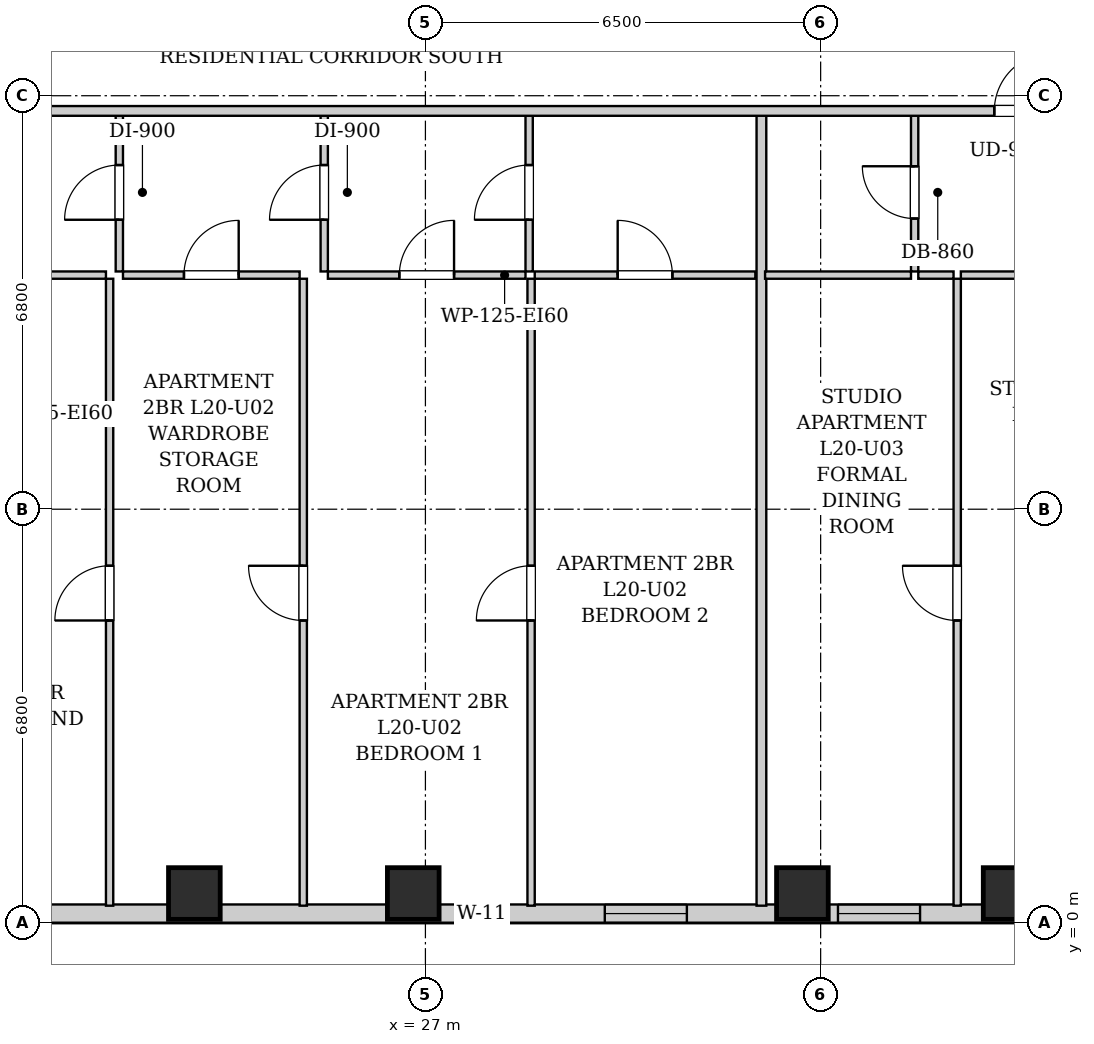
"""IFC4 building model, lengths in metres.
Left out: names, types, materials, properties, quantities, classifications, styles, units other than length and angle.
Written with IfcOpenShell. Run it as: python <this file> out.ifc"""

import sys

from ifc_helpers import new_model, si_unit, direction, frame, frame_2d, origin, origin_2d, place, context, subcontext, project, spatial, rectangle, extrude, element, fill, save


model = new_model("IFC4")
c1 = context("Model", 3, precision=1e-05, world=origin(), true_north=direction((0.0, 1.0)))
c2 = subcontext(c1, "Body", "Model", "MODEL_VIEW")
j1 = project(units=[si_unit("LENGTHUNIT", "METRE"), si_unit("PLANEANGLEUNIT", "RADIAN")], contexts=[c1])
p1 = place(None, origin())
s1 = spatial("IfcSite", under=j1, at=p1, CompositionType="ELEMENT")
p2 = place(p1, origin())
s2 = spatial("IfcBuilding", under=s1, at=p2, CompositionType="ELEMENT")
p3 = place(p2, frame((0.0, 0.0, 75.1)))
s3 = spatial("IfcBuildingStorey", under=s2, at=p3, CompositionType="ELEMENT", Elevation=75.1)
for number, where, z_axis, x_axis in (
    (1, (23.2, 0.48, 0.0), (0.0, 0.0, 1.0), (1.0, 0.0, 0.0)),
    (2, (26.8, 0.48, 0.0), (0.0, 0.0, 1.0), (1.0, 0.0, 0.0)),
    (3, (33.2, 0.48, 0.0), (0.0, 0.0, 1.0), (1.0, 0.0, 0.0)),
    (4, (36.6, 0.48, 0.0), (0.0, 0.0, 1.0), (1.0, 0.0, 0.0)),
):
    element("IfcColumn", number, at=place(p3, frame(where, z_axis=z_axis, x_axis=x_axis)), inside=s3, PredefinedType="COLUMN", context=c2, shape_type="SweptSolid", body=[
        extrude(rectangle(XDim=0.85, YDim=0.85, at=origin_2d()), origin(), (0.0, 0.0, 1.0), 3.2),
    ])
p4 = place(p3, frame((40.9, 0.15, 0.0), z_axis=(0.0, 0.0, 1.0), x_axis=(-1.0, 0.0, 0.0)))
e5 = element("IfcWall", 5, at=p4, inside=s3, PredefinedType="SOLIDWALL", context=c2, shape_type="SweptSolid", body=[
    extrude(rectangle(XDim=23.7, YDim=0.3, at=frame_2d((11.85, 0.0))), origin(), (0.0, 0.0, 1.0), 2.94),
])
p5 = place(p4, frame((20.625, 0.0, 0.55)))
e6 = element("IfcOpeningElement", 6, at=p5, cuts=e5, PredefinedType="OPENING", context=c2, shape_type="SweptSolid", body=[
    extrude(rectangle(XDim=1.35, YDim=1.2, at=frame_2d((0.675, 0.6))), frame((0.0, 0.16, 0.0), z_axis=(0.0, -1.0, 0.0), x_axis=(1.0, 0.0, 0.0)), (0.0, 0.0, 1.0), 0.32),
])
p6 = place(p4, frame((12.55, 0.0, 0.55)))
e7 = element("IfcOpeningElement", 7, at=p6, cuts=e5, PredefinedType="OPENING", context=c2, shape_type="SweptSolid", body=[
    extrude(rectangle(XDim=0.85, YDim=1.2, at=frame_2d((0.425, 0.6))), frame((0.0, 0.16, 0.0), z_axis=(0.0, -1.0, 0.0), x_axis=(1.0, 0.0, 0.0)), (0.0, 0.0, 1.0), 0.32),
])
p7 = place(p4, frame((9.6, 0.0, 0.55)))
e8 = element("IfcOpeningElement", 8, at=p7, cuts=e5, PredefinedType="OPENING", context=c2, shape_type="SweptSolid", body=[
    extrude(rectangle(XDim=1.35, YDim=1.2, at=frame_2d((0.675, 0.6))), frame((0.0, 0.16, 0.0), z_axis=(0.0, -1.0, 0.0), x_axis=(1.0, 0.0, 0.0)), (0.0, 0.0, 1.0), 0.32),
])
p8 = place(p4, frame((5.765, 0.0, 0.55)))
e9 = element("IfcOpeningElement", 9, at=p8, cuts=e5, PredefinedType="OPENING", context=c2, shape_type="SweptSolid", body=[
    extrude(rectangle(XDim=1.35, YDim=1.2, at=frame_2d((0.675, 0.6))), frame((0.0, 0.16, 0.0), z_axis=(0.0, -1.0, 0.0), x_axis=(1.0, 0.0, 0.0)), (0.0, 0.0, 1.0), 0.32),
])
p9 = place(p4, frame((2.1, 0.0, 0.55)))
e10 = element("IfcOpeningElement", 10, at=p9, cuts=e5, PredefinedType="OPENING", context=c2, shape_type="SweptSolid", body=[
    extrude(rectangle(XDim=1.35, YDim=1.2, at=frame_2d((0.675, 0.6))), frame((0.0, 0.16, 0.0), z_axis=(0.0, -1.0, 0.0), x_axis=(1.0, 0.0, 0.0)), (0.0, 0.0, 1.0), 0.32),
])
p10 = place(p3, frame((21.966, 10.71, 0.0), z_axis=(0.0, 0.0, 1.0), x_axis=(0.0, 1.0, 0.0)))
e11 = element("IfcWall", 11, at=p10, inside=s3, PredefinedType="PARTITIONING", context=c2, shape_type="SweptSolid", body=[
    extrude(rectangle(XDim=2.6, YDim=0.12, at=frame_2d((1.3, 0.0))), origin(), (0.0, 0.0, 1.0), 2.94),
])
p11 = place(p10, frame((0.85, 0.0, 0.0)))
e12 = element("IfcOpeningElement", 12, at=p11, cuts=e11, PredefinedType="OPENING", context=c2, shape_type="SweptSolid", body=[
    extrude(rectangle(XDim=0.9, YDim=2.05, at=frame_2d((0.45, 1.025))), frame((0.0, 0.07, 0.0), z_axis=(0.0, -1.0, 0.0), x_axis=(1.0, 0.0, 0.0)), (0.0, 0.0, 1.0), 0.14),
])
p12 = place(p3, frame((17.466, 10.65, 0.0), z_axis=(0.0, 0.0, 1.0), x_axis=(1.0, 0.0, 0.0)))
e13 = element("IfcWall", 13, at=p12, inside=s3, PredefinedType="PARTITIONING", context=c2, shape_type="SweptSolid", body=[
    extrude(rectangle(XDim=4.28, YDim=0.12, at=frame_2d((2.14, 0.0))), origin(), (0.0, 0.0, 1.0), 2.94),
])
p13 = place(p12, frame((1.69, 0.0, 0.0)))
e14 = element("IfcOpeningElement", 14, at=p13, cuts=e13, PredefinedType="OPENING", context=c2, shape_type="SweptSolid", body=[
    extrude(rectangle(XDim=0.9, YDim=2.05, at=frame_2d((0.45, 1.025))), frame((0.0, 0.07, 0.0), z_axis=(0.0, -1.0, 0.0), x_axis=(1.0, 0.0, 0.0)), (0.0, 0.0, 1.0), 0.14),
])
p14 = place(p3, frame((25.336, 10.71, 0.0), z_axis=(0.0, 0.0, 1.0), x_axis=(0.0, 1.0, 0.0)))
e15 = element("IfcWall", 15, at=p14, inside=s3, PredefinedType="PARTITIONING", context=c2, shape_type="SweptSolid", body=[
    extrude(rectangle(XDim=2.6, YDim=0.12, at=frame_2d((1.3, 0.0))), origin(), (0.0, 0.0, 1.0), 2.94),
])
p15 = place(p14, frame((0.85, 0.0, 0.0)))
e16 = element("IfcOpeningElement", 16, at=p15, cuts=e15, PredefinedType="OPENING", context=c2, shape_type="SweptSolid", body=[
    extrude(rectangle(XDim=0.9, YDim=2.05, at=frame_2d((0.45, 1.025))), frame((0.0, 0.07, 0.0), z_axis=(0.0, -1.0, 0.0), x_axis=(1.0, 0.0, 0.0)), (0.0, 0.0, 1.0), 0.14),
])
p16 = place(p3, frame((22.026, 10.65, 0.0), z_axis=(0.0, 0.0, 1.0), x_axis=(1.0, 0.0, 0.0)))
e17 = element("IfcWall", 17, at=p16, inside=s3, PredefinedType="PARTITIONING", context=c2, shape_type="SweptSolid", body=[
    extrude(rectangle(XDim=2.905, YDim=0.12, at=frame_2d((1.453, 0.0))), origin(), (0.0, 0.0, 1.0), 2.94),
])
p17 = place(p16, frame((1.003, 0.0, 0.0)))
e18 = element("IfcOpeningElement", 18, at=p17, cuts=e17, PredefinedType="OPENING", context=c2, shape_type="SweptSolid", body=[
    extrude(rectangle(XDim=0.9, YDim=2.05, at=frame_2d((0.45, 1.025))), frame((0.0, 0.07, 0.0), z_axis=(0.0, -1.0, 0.0), x_axis=(1.0, 0.0, 0.0)), (0.0, 0.0, 1.0), 0.14),
])
p18 = place(p3, frame((28.706, 10.71, 0.0), z_axis=(0.0, 0.0, 1.0), x_axis=(0.0, 1.0, 0.0)))
e19 = element("IfcWall", 19, at=p18, inside=s3, PredefinedType="PARTITIONING", context=c2, shape_type="SweptSolid", body=[
    extrude(rectangle(XDim=2.6, YDim=0.12, at=frame_2d((1.3, 0.0))), origin(), (0.0, 0.0, 1.0), 2.94),
])
p19 = place(p18, frame((0.85, 0.0, 0.0)))
e20 = element("IfcOpeningElement", 20, at=p19, cuts=e19, PredefinedType="OPENING", context=c2, shape_type="SweptSolid", body=[
    extrude(rectangle(XDim=0.9, YDim=2.05, at=frame_2d((0.45, 1.025))), frame((0.0, 0.07, 0.0), z_axis=(0.0, -1.0, 0.0), x_axis=(1.0, 0.0, 0.0)), (0.0, 0.0, 1.0), 0.14),
])
p20 = place(p3, frame((25.396, 10.65, 0.0), z_axis=(0.0, 0.0, 1.0), x_axis=(1.0, 0.0, 0.0)))
e21 = element("IfcWall", 21, at=p20, inside=s3, PredefinedType="PARTITIONING", context=c2, shape_type="SweptSolid", body=[
    extrude(rectangle(XDim=3.25, YDim=0.12, at=frame_2d((1.625, 0.0))), origin(), (0.0, 0.0, 1.0), 2.94),
])
p21 = place(p20, frame((1.175, 0.0, 0.0)))
e22 = element("IfcOpeningElement", 22, at=p21, cuts=e21, PredefinedType="OPENING", context=c2, shape_type="SweptSolid", body=[
    extrude(rectangle(XDim=0.9, YDim=2.05, at=frame_2d((0.45, 1.025))), frame((0.0, 0.07, 0.0), z_axis=(0.0, -1.0, 0.0), x_axis=(1.0, 0.0, 0.0)), (0.0, 0.0, 1.0), 0.14),
])
p22 = place(p3, frame((28.798, 10.65, 0.0), z_axis=(0.0, 0.0, 1.0), x_axis=(1.0, 0.0, 0.0)))
e23 = element("IfcWall", 23, at=p22, inside=s3, PredefinedType="PARTITIONING", context=c2, shape_type="SweptSolid", body=[
    extrude(rectangle(XDim=3.628, YDim=0.12, at=frame_2d((1.814, 0.0))), origin(), (0.0, 0.0, 1.0), 2.94),
])
p23 = place(p22, frame((1.364, 0.0, 0.0)))
e24 = element("IfcOpeningElement", 24, at=p23, cuts=e23, PredefinedType="OPENING", context=c2, shape_type="SweptSolid", body=[
    extrude(rectangle(XDim=0.9, YDim=2.05, at=frame_2d((0.45, 1.025))), frame((0.0, 0.07, 0.0), z_axis=(0.0, -1.0, 0.0), x_axis=(1.0, 0.0, 0.0)), (0.0, 0.0, 1.0), 0.14),
])
p24 = place(p3, frame((21.806, 0.28, 0.0), z_axis=(0.0, 0.0, 1.0), x_axis=(0.0, 1.0, 0.0)))
e25 = element("IfcWall", 25, at=p24, inside=s3, PredefinedType="PARTITIONING", context=c2, shape_type="SweptSolid", body=[
    extrude(rectangle(XDim=10.31, YDim=0.12, at=frame_2d((5.155, 0.0))), origin(), (0.0, 0.0, 1.0), 2.94),
])
p25 = place(p24, frame((4.69, 0.0, 0.0)))
e26 = element("IfcOpeningElement", 26, at=p25, cuts=e25, PredefinedType="OPENING", context=c2, shape_type="SweptSolid", body=[
    extrude(rectangle(XDim=0.9, YDim=2.05, at=frame_2d((0.45, 1.025))), frame((0.0, 0.07, 0.0), z_axis=(0.0, -1.0, 0.0), x_axis=(1.0, 0.0, 0.0)), (0.0, 0.0, 1.0), 0.14),
])
p26 = place(p3, frame((24.991, 0.28, 0.0), z_axis=(0.0, 0.0, 1.0), x_axis=(0.0, 1.0, 0.0)))
e27 = element("IfcWall", 27, at=p26, inside=s3, PredefinedType="PARTITIONING", context=c2, shape_type="SweptSolid", body=[
    extrude(rectangle(XDim=10.31, YDim=0.12, at=frame_2d((5.155, 0.0))), origin(), (0.0, 0.0, 1.0), 2.94),
])
p27 = place(p26, frame((4.69, 0.0, 0.0)))
e28 = element("IfcOpeningElement", 28, at=p27, cuts=e27, PredefinedType="OPENING", context=c2, shape_type="SweptSolid", body=[
    extrude(rectangle(XDim=0.9, YDim=2.05, at=frame_2d((0.45, 1.025))), frame((0.0, 0.07, 0.0), z_axis=(0.0, -1.0, 0.0), x_axis=(1.0, 0.0, 0.0)), (0.0, 0.0, 1.0), 0.14),
])
p28 = place(p3, frame((28.738, 0.28, 0.0), z_axis=(0.0, 0.0, 1.0), x_axis=(0.0, 1.0, 0.0)))
e29 = element("IfcWall", 29, at=p28, inside=s3, PredefinedType="PARTITIONING", context=c2, shape_type="SweptSolid", body=[
    extrude(rectangle(XDim=10.31, YDim=0.12, at=frame_2d((5.155, 0.0))), origin(), (0.0, 0.0, 1.0), 2.94),
])
p29 = place(p28, frame((4.69, 0.0, 0.0)))
e30 = element("IfcOpeningElement", 30, at=p29, cuts=e29, PredefinedType="OPENING", context=c2, shape_type="SweptSolid", body=[
    extrude(rectangle(XDim=0.9, YDim=2.05, at=frame_2d((0.45, 1.025))), frame((0.0, 0.07, 0.0), z_axis=(0.0, -1.0, 0.0), x_axis=(1.0, 0.0, 0.0)), (0.0, 0.0, 1.0), 0.14),
])
p30 = place(p3, frame((32.526, 0.28, 0.0), z_axis=(0.0, 0.0, 1.0), x_axis=(0.0, 1.0, 0.0)))
e31 = element("IfcWall", 31, at=p30, inside=s3, PredefinedType="PARTITIONING", context=c2, shape_type="SweptSolid", body=[
    extrude(rectangle(XDim=13.03, YDim=0.16, at=frame_2d((6.515, 0.0))), origin(), (0.0, 0.0, 1.0), 2.94),
])
p31 = place(p3, frame((35.046, 10.71, 0.0), z_axis=(0.0, 0.0, 1.0), x_axis=(0.0, 1.0, 0.0)))
e32 = element("IfcWall", 32, at=p31, inside=s3, PredefinedType="PARTITIONING", context=c2, shape_type="SweptSolid", body=[
    extrude(rectangle(XDim=2.6, YDim=0.12, at=frame_2d((1.3, 0.0))), origin(), (0.0, 0.0, 1.0), 2.94),
])
p32 = place(p31, frame((0.87, 0.0, 0.0)))
e33 = element("IfcOpeningElement", 33, at=p32, cuts=e32, PredefinedType="OPENING", context=c2, shape_type="SweptSolid", body=[
    extrude(rectangle(XDim=0.86, YDim=2.05, at=frame_2d((0.43, 1.025))), frame((0.0, 0.07, 0.0), z_axis=(0.0, -1.0, 0.0), x_axis=(1.0, 0.0, 0.0)), (0.0, 0.0, 1.0), 0.14),
])
p33 = place(p3, frame((32.586, 10.65, 0.0), z_axis=(0.0, 0.0, 1.0), x_axis=(1.0, 0.0, 0.0)))
e34 = element("IfcWall", 34, at=p33, inside=s3, PredefinedType="PARTITIONING", context=c2, shape_type="SweptSolid", body=[
    extrude(rectangle(XDim=2.4, YDim=0.12, at=frame_2d((1.2, 0.0))), origin(), (0.0, 0.0, 1.0), 2.94),
])
p34 = place(p3, frame((35.106, 10.65, 0.0), z_axis=(0.0, 0.0, 1.0), x_axis=(1.0, 0.0, 0.0)))
e35 = element("IfcWall", 35, at=p34, inside=s3, PredefinedType="PARTITIONING", context=c2, shape_type="SweptSolid", body=[
    extrude(rectangle(XDim=0.58, YDim=0.12, at=frame_2d((0.29, 0.0))), origin(), (0.0, 0.0, 1.0), 2.94),
])
p35 = place(p3, frame((35.806, 10.65, 0.0), z_axis=(0.0, 0.0, 1.0), x_axis=(1.0, 0.0, 0.0)))
e36 = element("IfcWall", 36, at=p35, inside=s3, PredefinedType="PARTITIONING", context=c2, shape_type="SweptSolid", body=[
    extrude(rectangle(XDim=2.75, YDim=0.12, at=frame_2d((1.375, 0.0))), origin(), (0.0, 0.0, 1.0), 2.94),
])
p36 = place(p35, frame((0.925, 0.0, 0.0)))
e37 = element("IfcOpeningElement", 37, at=p36, cuts=e36, PredefinedType="OPENING", context=c2, shape_type="SweptSolid", body=[
    extrude(rectangle(XDim=0.9, YDim=2.05, at=frame_2d((0.45, 1.025))), frame((0.0, 0.07, 0.0), z_axis=(0.0, -1.0, 0.0), x_axis=(1.0, 0.0, 0.0)), (0.0, 0.0, 1.0), 0.14),
])
p37 = place(p3, frame((35.746, 0.28, 0.0), z_axis=(0.0, 0.0, 1.0), x_axis=(0.0, 1.0, 0.0)))
e38 = element("IfcWall", 38, at=p37, inside=s3, PredefinedType="PARTITIONING", context=c2, shape_type="SweptSolid", body=[
    extrude(rectangle(XDim=10.31, YDim=0.12, at=frame_2d((5.155, 0.0))), origin(), (0.0, 0.0, 1.0), 2.94),
])
p38 = place(p37, frame((4.69, 0.0, 0.0)))
e39 = element("IfcOpeningElement", 39, at=p38, cuts=e38, PredefinedType="OPENING", context=c2, shape_type="SweptSolid", body=[
    extrude(rectangle(XDim=0.9, YDim=2.05, at=frame_2d((0.45, 1.025))), frame((0.0, 0.07, 0.0), z_axis=(0.0, -1.0, 0.0), x_axis=(1.0, 0.0, 0.0)), (0.0, 0.0, 1.0), 0.14),
])
p39 = place(p3, frame((10.05, 13.35, 0.0), z_axis=(0.0, 0.0, 1.0), x_axis=(1.0, 0.0, 0.0)))
e40 = element("IfcWall", 40, at=p39, inside=s3, PredefinedType="PARTITIONING", context=c2, shape_type="SweptSolid", body=[
    extrude(rectangle(XDim=30.8, YDim=0.16, at=frame_2d((15.4, 0.0))), origin(), (0.0, 0.0, 1.0), 2.94),
])
p40 = place(p39, frame((2.893, 0.0, 0.0)))
e41 = element("IfcOpeningElement", 41, at=p40, cuts=e40, PredefinedType="OPENING", context=c2, shape_type="SweptSolid", body=[
    extrude(rectangle(XDim=0.95, YDim=2.1, at=frame_2d((0.475, 1.05))), frame((0.0, 0.09, 0.0), z_axis=(0.0, -1.0, 0.0), x_axis=(1.0, 0.0, 0.0)), (0.0, 0.0, 1.0), 0.18),
])
p41 = place(p39, frame((9.161, 0.0, 0.0)))
e42 = element("IfcOpeningElement", 42, at=p41, cuts=e40, PredefinedType="OPENING", context=c2, shape_type="SweptSolid", body=[
    extrude(rectangle(XDim=0.95, YDim=2.1, at=frame_2d((0.475, 1.05))), frame((0.0, 0.09, 0.0), z_axis=(0.0, -1.0, 0.0), x_axis=(1.0, 0.0, 0.0)), (0.0, 0.0, 1.0), 0.18),
])
p42 = place(p39, frame((26.306, 0.0, 0.0)))
e43 = element("IfcOpeningElement", 43, at=p42, cuts=e40, PredefinedType="OPENING", context=c2, shape_type="SweptSolid", body=[
    extrude(rectangle(XDim=0.95, YDim=2.1, at=frame_2d((0.475, 1.05))), frame((0.0, 0.09, 0.0), z_axis=(0.0, -1.0, 0.0), x_axis=(1.0, 0.0, 0.0)), (0.0, 0.0, 1.0), 0.18),
])
p43 = place(p11, origin())
e44 = element("IfcDoor", 44, at=p43, inside=s3, OperationType="SINGLE_SWING_LEFT", PredefinedType="DOOR", context=c2, shape_type="SweptSolid", body=[
    extrude(rectangle(XDim=0.9, YDim=2.05, at=frame_2d((0.45, 1.025))), frame((0.0, 0.025, 0.0), z_axis=(0.0, -1.0, 0.0), x_axis=(1.0, 0.0, 0.0)), (0.0, 0.0, 1.0), 0.05),
])
fill(e12, e44)
p44 = place(p15, origin())
e45 = element("IfcDoor", 45, at=p44, inside=s3, OperationType="SINGLE_SWING_LEFT", PredefinedType="DOOR", context=c2, shape_type="SweptSolid", body=[
    extrude(rectangle(XDim=0.9, YDim=2.05, at=frame_2d((0.45, 1.025))), frame((0.0, 0.025, 0.0), z_axis=(0.0, -1.0, 0.0), x_axis=(1.0, 0.0, 0.0)), (0.0, 0.0, 1.0), 0.05),
])
fill(e16, e45)
p45 = place(p17, origin())
e46 = element("IfcDoor", 46, at=p45, inside=s3, OperationType="SINGLE_SWING_RIGHT", PredefinedType="DOOR", context=c2, shape_type="SweptSolid", body=[
    extrude(rectangle(XDim=0.9, YDim=2.05, at=frame_2d((0.45, 1.025))), frame((0.0, 0.025, 0.0), z_axis=(0.0, -1.0, 0.0), x_axis=(1.0, 0.0, 0.0)), (0.0, 0.0, 1.0), 0.05),
])
fill(e18, e46)
p46 = place(p19, origin())
e47 = element("IfcDoor", 47, at=p46, inside=s3, OperationType="SINGLE_SWING_LEFT", PredefinedType="DOOR", context=c2, shape_type="SweptSolid", body=[
    extrude(rectangle(XDim=0.9, YDim=2.05, at=frame_2d((0.45, 1.025))), frame((0.0, 0.025, 0.0), z_axis=(0.0, -1.0, 0.0), x_axis=(1.0, 0.0, 0.0)), (0.0, 0.0, 1.0), 0.05),
])
fill(e20, e47)
p47 = place(p21, origin())
e48 = element("IfcDoor", 48, at=p47, inside=s3, OperationType="SINGLE_SWING_RIGHT", PredefinedType="DOOR", context=c2, shape_type="SweptSolid", body=[
    extrude(rectangle(XDim=0.9, YDim=2.05, at=frame_2d((0.45, 1.025))), frame((0.0, 0.025, 0.0), z_axis=(0.0, -1.0, 0.0), x_axis=(1.0, 0.0, 0.0)), (0.0, 0.0, 1.0), 0.05),
])
fill(e22, e48)
p48 = place(p23, origin())
e49 = element("IfcDoor", 49, at=p48, inside=s3, OperationType="SINGLE_SWING_LEFT", PredefinedType="DOOR", context=c2, shape_type="SweptSolid", body=[
    extrude(rectangle(XDim=0.9, YDim=2.05, at=frame_2d((0.45, 1.025))), frame((0.0, 0.025, 0.0), z_axis=(0.0, -1.0, 0.0), x_axis=(1.0, 0.0, 0.0)), (0.0, 0.0, 1.0), 0.05),
])
fill(e24, e49)
p49 = place(p25, origin())
e50 = element("IfcDoor", 50, at=p49, inside=s3, OperationType="SINGLE_SWING_LEFT", PredefinedType="DOOR", context=c2, shape_type="SweptSolid", body=[
    extrude(rectangle(XDim=0.9, YDim=2.05, at=frame_2d((0.45, 1.025))), frame((0.0, 0.025, 0.0), z_axis=(0.0, -1.0, 0.0), x_axis=(1.0, 0.0, 0.0)), (0.0, 0.0, 1.0), 0.05),
])
fill(e26, e50)
p50 = place(p27, origin())
e51 = element("IfcDoor", 51, at=p50, inside=s3, OperationType="SINGLE_SWING_RIGHT", PredefinedType="DOOR", context=c2, shape_type="SweptSolid", body=[
    extrude(rectangle(XDim=0.9, YDim=2.05, at=frame_2d((0.45, 1.025))), frame((0.0, 0.025, 0.0), z_axis=(0.0, -1.0, 0.0), x_axis=(1.0, 0.0, 0.0)), (0.0, 0.0, 1.0), 0.05),
])
fill(e28, e51)
p51 = place(p29, origin())
e52 = element("IfcDoor", 52, at=p51, inside=s3, OperationType="SINGLE_SWING_LEFT", PredefinedType="DOOR", context=c2, shape_type="SweptSolid", body=[
    extrude(rectangle(XDim=0.9, YDim=2.05, at=frame_2d((0.45, 1.025))), frame((0.0, 0.025, 0.0), z_axis=(0.0, -1.0, 0.0), x_axis=(1.0, 0.0, 0.0)), (0.0, 0.0, 1.0), 0.05),
])
fill(e30, e52)
p52 = place(p32, origin())
e53 = element("IfcDoor", 53, at=p52, inside=s3, OperationType="SINGLE_SWING_RIGHT", PredefinedType="DOOR", context=c2, shape_type="SweptSolid", body=[
    extrude(rectangle(XDim=0.86, YDim=2.05, at=frame_2d((0.43, 1.025))), frame((0.0, 0.025, 0.0), z_axis=(0.0, -1.0, 0.0), x_axis=(1.0, 0.0, 0.0)), (0.0, 0.0, 1.0), 0.05),
])
fill(e33, e53)
p53 = place(p38, origin())
e54 = element("IfcDoor", 54, at=p53, inside=s3, OperationType="SINGLE_SWING_RIGHT", PredefinedType="DOOR", context=c2, shape_type="SweptSolid", body=[
    extrude(rectangle(XDim=0.9, YDim=2.05, at=frame_2d((0.45, 1.025))), frame((0.0, 0.025, 0.0), z_axis=(0.0, -1.0, 0.0), x_axis=(1.0, 0.0, 0.0)), (0.0, 0.0, 1.0), 0.05),
])
fill(e39, e54)
p54 = place(p42, origin())
e55 = element("IfcDoor", 55, at=p54, inside=s3, OperationType="SINGLE_SWING_RIGHT", PredefinedType="DOOR", context=c2, shape_type="SweptSolid", body=[
    extrude(rectangle(XDim=0.95, YDim=2.1, at=frame_2d((0.475, 1.05))), frame((0.0, 0.025, 0.0), z_axis=(0.0, -1.0, 0.0), x_axis=(1.0, 0.0, 0.0)), (0.0, 0.0, 1.0), 0.05),
])
fill(e43, e55)
p55 = place(p6, origin())
e56 = element("IfcWindow", 56, at=p55, inside=s3, PartitioningType="SINGLE_PANEL", PredefinedType="WINDOW", context=c2, shape_type="SweptSolid", body=[
    extrude(rectangle(XDim=0.85, YDim=1.2, at=frame_2d((0.425, 0.6))), frame((0.0, 0.03, 0.0), z_axis=(0.0, -1.0, 0.0), x_axis=(1.0, 0.0, 0.0)), (0.0, 0.0, 1.0), 0.06),
])
fill(e7, e56)
p56 = place(p7, origin())
e57 = element("IfcWindow", 57, at=p56, inside=s3, PartitioningType="SINGLE_PANEL", PredefinedType="WINDOW", context=c2, shape_type="SweptSolid", body=[
    extrude(rectangle(XDim=1.35, YDim=1.2, at=frame_2d((0.675, 0.6))), frame((0.0, 0.03, 0.0), z_axis=(0.0, -1.0, 0.0), x_axis=(1.0, 0.0, 0.0)), (0.0, 0.0, 1.0), 0.06),
])
fill(e8, e57)
p57 = place(p8, origin())
e58 = element("IfcWindow", 58, at=p57, inside=s3, PartitioningType="SINGLE_PANEL", PredefinedType="WINDOW", context=c2, shape_type="SweptSolid", body=[
    extrude(rectangle(XDim=1.35, YDim=1.2, at=frame_2d((0.675, 0.6))), frame((0.0, 0.03, 0.0), z_axis=(0.0, -1.0, 0.0), x_axis=(1.0, 0.0, 0.0)), (0.0, 0.0, 1.0), 0.06),
])
fill(e9, e58)
save(model, sys.argv[1])
